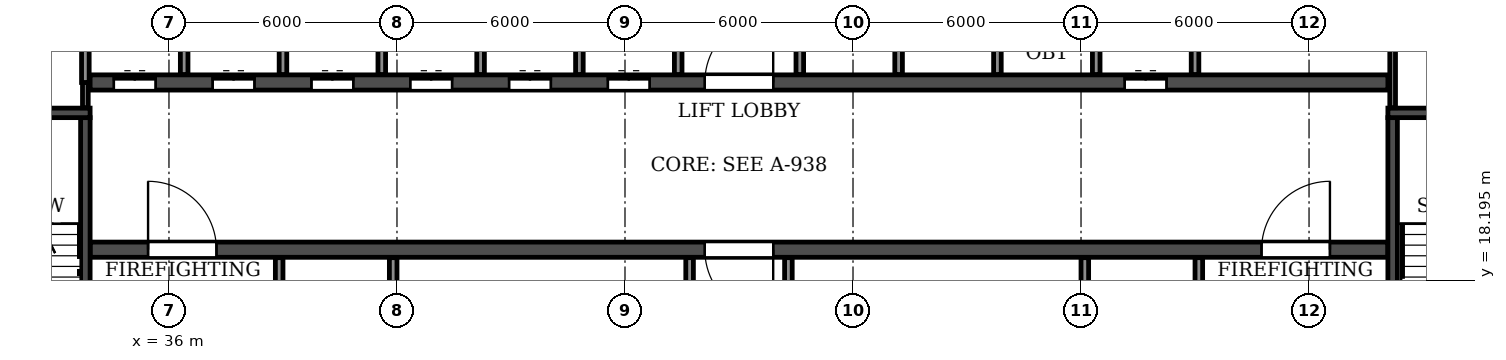
"""IFC4 building model, lengths in metres.
Left out: names, types, materials, properties, quantities, classifications, styles, units other than length and angle.
Written with IfcOpenShell. Run it as: python <this file> out.ifc"""

import sys

from ifc_helpers import new_model, si_unit, direction, frame, frame_2d, origin, place, context, subcontext, project, spatial, rectangle, extrude, element, fill, save


model = new_model("IFC4")
c1 = context("Model", 3, precision=1e-05, world=origin(), true_north=direction((0.0, 1.0)))
c2 = subcontext(c1, "Body", "Model", "MODEL_VIEW")
j1 = project(units=[si_unit("LENGTHUNIT", "METRE"), si_unit("PLANEANGLEUNIT", "RADIAN")], contexts=[c1])
p1 = place(None, origin())
s1 = spatial("IfcSite", under=j1, at=p1, CompositionType="ELEMENT")
p2 = place(p1, origin())
s2 = spatial("IfcBuilding", under=s1, at=p2, CompositionType="ELEMENT")
p3 = place(p2, frame((0.0, 0.0, 214.8)))
s3 = spatial("IfcBuildingStorey", under=s2, at=p3, CompositionType="ELEMENT", Elevation=214.8)
p4 = place(p3, frame((33.925, 19.0, 0.0), z_axis=(0.0, 0.0, 1.0), x_axis=(1.0, 0.0, 0.0)))
e1 = element("IfcWall", 1, at=p4, inside=s3, PredefinedType="SOLIDWALL", context=c2, shape_type="SweptSolid", body=[
    extrude(rectangle(XDim=34.15, YDim=0.4, at=frame_2d((17.075, 0.0))), origin(), (0.0, 0.0, 1.0), 6.38),
])
p5 = place(p4, frame((16.175, 0.0, 0.0)))
e2 = element("IfcOpeningElement", 2, at=p5, cuts=e1, PredefinedType="OPENING", context=c2, shape_type="SweptSolid", body=[
    extrude(rectangle(XDim=1.8, YDim=2.1, at=frame_2d((0.9, 1.05))), frame((0.0, 0.21, 0.0), z_axis=(0.0, -1.0, 0.0), x_axis=(1.0, 0.0, 0.0)), (0.0, 0.0, 1.0), 0.42),
])
p6 = place(p4, frame((1.525, 0.0, 0.0)))
e3 = element("IfcOpeningElement", 3, at=p6, cuts=e1, PredefinedType="OPENING", context=c2, shape_type="SweptSolid", body=[
    extrude(rectangle(XDim=1.8, YDim=2.1, at=frame_2d((0.9, 1.05))), frame((0.0, 0.21, 0.0), z_axis=(0.0, -1.0, 0.0), x_axis=(1.0, 0.0, 0.0)), (0.0, 0.0, 1.0), 0.42),
])
p7 = place(p4, frame((30.825, 0.0, 0.0)))
e4 = element("IfcOpeningElement", 4, at=p7, cuts=e1, PredefinedType="OPENING", context=c2, shape_type="SweptSolid", body=[
    extrude(rectangle(XDim=1.8, YDim=2.1, at=frame_2d((0.9, 1.05))), frame((0.0, 0.21, 0.0), z_axis=(0.0, -1.0, 0.0), x_axis=(1.0, 0.0, 0.0)), (0.0, 0.0, 1.0), 0.42),
])
p8 = place(p3, frame((33.925, 23.4, 0.0), z_axis=(0.0, 0.0, 1.0), x_axis=(1.0, 0.0, 0.0)))
e5 = element("IfcWall", 5, at=p8, inside=s3, PredefinedType="SOLIDWALL", context=c2, shape_type="SweptSolid", body=[
    extrude(rectangle(XDim=34.15, YDim=0.4, at=frame_2d((17.075, 0.0))), origin(), (0.0, 0.0, 1.0), 6.38),
])
p9 = place(p8, frame((16.175, 0.0, 0.0)))
e6 = element("IfcOpeningElement", 6, at=p9, cuts=e5, PredefinedType="OPENING", context=c2, shape_type="SweptSolid", body=[
    extrude(rectangle(XDim=1.8, YDim=2.1, at=frame_2d((0.9, 1.05))), frame((0.0, 0.21, 0.0), z_axis=(0.0, -1.0, 0.0), x_axis=(1.0, 0.0, 0.0)), (0.0, 0.0, 1.0), 0.42),
])
p10 = place(p8, frame((0.625, 0.0, 0.0)))
e7 = element("IfcOpeningElement", 7, at=p10, cuts=e5, PredefinedType="OPENING", context=c2, shape_type="SweptSolid", body=[
    extrude(rectangle(XDim=1.1, YDim=2.1, at=frame_2d((0.55, 1.05))), frame((0.0, 0.21, 0.0), z_axis=(0.0, -1.0, 0.0), x_axis=(1.0, 0.0, 0.0)), (0.0, 0.0, 1.0), 0.42),
])
p11 = place(p8, frame((3.225, 0.0, 0.0)))
e8 = element("IfcOpeningElement", 8, at=p11, cuts=e5, PredefinedType="OPENING", context=c2, shape_type="SweptSolid", body=[
    extrude(rectangle(XDim=1.1, YDim=2.1, at=frame_2d((0.55, 1.05))), frame((0.0, 0.21, 0.0), z_axis=(0.0, -1.0, 0.0), x_axis=(1.0, 0.0, 0.0)), (0.0, 0.0, 1.0), 0.42),
])
p12 = place(p8, frame((5.825, 0.0, 0.0)))
e9 = element("IfcOpeningElement", 9, at=p12, cuts=e5, PredefinedType="OPENING", context=c2, shape_type="SweptSolid", body=[
    extrude(rectangle(XDim=1.1, YDim=2.1, at=frame_2d((0.55, 1.05))), frame((0.0, 0.21, 0.0), z_axis=(0.0, -1.0, 0.0), x_axis=(1.0, 0.0, 0.0)), (0.0, 0.0, 1.0), 0.42),
])
p13 = place(p8, frame((8.425, 0.0, 0.0)))
e10 = element("IfcOpeningElement", 10, at=p13, cuts=e5, PredefinedType="OPENING", context=c2, shape_type="SweptSolid", body=[
    extrude(rectangle(XDim=1.1, YDim=2.1, at=frame_2d((0.55, 1.05))), frame((0.0, 0.21, 0.0), z_axis=(0.0, -1.0, 0.0), x_axis=(1.0, 0.0, 0.0)), (0.0, 0.0, 1.0), 0.42),
])
p14 = place(p8, frame((11.025, 0.0, 0.0)))
e11 = element("IfcOpeningElement", 11, at=p14, cuts=e5, PredefinedType="OPENING", context=c2, shape_type="SweptSolid", body=[
    extrude(rectangle(XDim=1.1, YDim=2.1, at=frame_2d((0.55, 1.05))), frame((0.0, 0.21, 0.0), z_axis=(0.0, -1.0, 0.0), x_axis=(1.0, 0.0, 0.0)), (0.0, 0.0, 1.0), 0.42),
])
p15 = place(p8, frame((13.625, 0.0, 0.0)))
e12 = element("IfcOpeningElement", 12, at=p15, cuts=e5, PredefinedType="OPENING", context=c2, shape_type="SweptSolid", body=[
    extrude(rectangle(XDim=1.1, YDim=2.1, at=frame_2d((0.55, 1.05))), frame((0.0, 0.21, 0.0), z_axis=(0.0, -1.0, 0.0), x_axis=(1.0, 0.0, 0.0)), (0.0, 0.0, 1.0), 0.42),
])
p16 = place(p8, frame((27.225, 0.0, 0.0)))
e13 = element("IfcOpeningElement", 13, at=p16, cuts=e5, PredefinedType="OPENING", context=c2, shape_type="SweptSolid", body=[
    extrude(rectangle(XDim=1.1, YDim=2.1, at=frame_2d((0.55, 1.05))), frame((0.0, 0.21, 0.0), z_axis=(0.0, -1.0, 0.0), x_axis=(1.0, 0.0, 0.0)), (0.0, 0.0, 1.0), 0.42),
])
p17 = place(p3, frame((33.8, 14.8, 0.0), z_axis=(0.0, 0.0, 1.0), x_axis=(0.0, 1.0, 0.0)))
e14 = element("IfcWall", 14, at=p17, inside=s3, PredefinedType="SOLIDWALL", context=c2, shape_type="SweptSolid", body=[
    extrude(rectangle(XDim=7.675, YDim=0.25, at=frame_2d((3.837, 0.0))), origin(), (0.0, 0.0, 1.0), 6.38),
])
p18 = place(p17, frame((0.5, 0.0, 0.0)))
e15 = element("IfcOpeningElement", 15, at=p18, cuts=e14, PredefinedType="OPENING", context=c2, shape_type="SweptSolid", body=[
    extrude(rectangle(XDim=1.0, YDim=2.1, at=frame_2d((0.5, 1.05))), frame((0.0, 0.135, 0.0), z_axis=(0.0, -1.0, 0.0), x_axis=(1.0, 0.0, 0.0)), (0.0, 0.0, 1.0), 0.27),
])
p19 = place(p3, frame((29.875, 22.6, 0.0), z_axis=(0.0, 0.0, 1.0), x_axis=(1.0, 0.0, 0.0)))
e16 = element("IfcWall", 16, at=p19, inside=s3, PredefinedType="SOLIDWALL", context=c2, shape_type="SweptSolid", body=[
    extrude(rectangle(XDim=4.05, YDim=0.25, at=frame_2d((2.025, 0.0))), origin(), (0.0, 0.0, 1.0), 6.38),
])
p20 = place(p3, frame((68.2, 14.8, 0.0), z_axis=(0.0, 0.0, 1.0), x_axis=(0.0, 1.0, 0.0)))
e17 = element("IfcWall", 17, at=p20, inside=s3, PredefinedType="SOLIDWALL", context=c2, shape_type="SweptSolid", body=[
    extrude(rectangle(XDim=7.675, YDim=0.25, at=frame_2d((3.837, 0.0))), origin(), (0.0, 0.0, 1.0), 6.38),
])
p21 = place(p20, frame((0.5, 0.0, 0.0)))
e18 = element("IfcOpeningElement", 18, at=p21, cuts=e17, PredefinedType="OPENING", context=c2, shape_type="SweptSolid", body=[
    extrude(rectangle(XDim=1.0, YDim=2.1, at=frame_2d((0.5, 1.05))), frame((0.0, 0.135, 0.0), z_axis=(0.0, -1.0, 0.0), x_axis=(1.0, 0.0, 0.0)), (0.0, 0.0, 1.0), 0.27),
])
p22 = place(p3, frame((68.075, 22.6, 0.0), z_axis=(0.0, 0.0, 1.0), x_axis=(1.0, 0.0, 0.0)))
e19 = element("IfcWall", 19, at=p22, inside=s3, PredefinedType="SOLIDWALL", context=c2, shape_type="SweptSolid", body=[
    extrude(rectangle(XDim=4.05, YDim=0.25, at=frame_2d((2.025, 0.0))), origin(), (0.0, 0.0, 1.0), 6.38),
])
for number, where, z_axis, x_axis in (
    (20, (49.7, 14.91, 0.0), (0.0, 0.0, 1.0), (0.0, 1.0, 0.0)),
    (21, (52.3, 14.91, 0.0), (0.0, 0.0, 1.0), (0.0, 1.0, 0.0)),
):
    element("IfcWall", number, at=place(p3, frame(where, z_axis=z_axis, x_axis=x_axis)), inside=s3, PredefinedType="PARTITIONING", context=c2, shape_type="SweptSolid", body=[
        extrude(rectangle(XDim=3.88, YDim=0.2, at=frame_2d((1.94, 0.0))), origin(), (0.0, 0.0, 1.0), 6.38),
    ])
for number, where, z_axis, x_axis in (
    (22, (52.6, 23.61, 0.0), (0.0, 0.0, 1.0), (0.0, 1.0, 0.0)),
    (23, (55.2, 23.61, 0.0), (0.0, 0.0, 1.0), (0.0, 1.0, 0.0)),
):
    element("IfcWall", number, at=place(p3, frame(where, z_axis=z_axis, x_axis=x_axis)), inside=s3, PredefinedType="PARTITIONING", context=c2, shape_type="SweptSolid", body=[
        extrude(rectangle(XDim=3.88, YDim=0.2, at=frame_2d((1.94, 0.0))), origin(), (0.0, 0.0, 1.0), 6.38),
    ])
p23 = place(p3, frame((33.8, 22.735, 0.0), z_axis=(0.0, 0.0, 1.0), x_axis=(0.0, 1.0, 0.0)))
e24 = element("IfcWall", 24, at=p23, inside=s3, PredefinedType="PARTITIONING", context=c2, shape_type="SweptSolid", body=[
    extrude(rectangle(XDim=0.665, YDim=0.15, at=frame_2d((0.333, 0.0))), origin(), (0.0, 0.0, 1.0), 6.38),
])
p24 = place(p3, frame((68.2, 22.735, 0.0), z_axis=(0.0, 0.0, 1.0), x_axis=(0.0, 1.0, 0.0)))
e25 = element("IfcWall", 25, at=p24, inside=s3, PredefinedType="PARTITIONING", context=c2, shape_type="SweptSolid", body=[
    extrude(rectangle(XDim=4.755, YDim=0.15, at=frame_2d((2.377, 0.0))), origin(), (0.0, 0.0, 1.0), 6.38),
])
p25 = place(p3, frame((33.8, 23.4, 0.0), z_axis=(0.0, 0.0, 1.0), x_axis=(0.0, 1.0, 0.0)))
e26 = element("IfcWall", 26, at=p25, inside=s3, PredefinedType="PARTITIONING", context=c2, shape_type="SweptSolid", body=[
    extrude(rectangle(XDim=2.7, YDim=0.2, at=frame_2d((1.35, 0.0))), origin(), (0.0, 0.0, 1.0), 6.38),
])
p26 = place(p3, frame((36.4, 23.61, 0.0), z_axis=(0.0, 0.0, 1.0), x_axis=(0.0, 1.0, 0.0)))
e27 = element("IfcWall", 27, at=p26, inside=s3, PredefinedType="PARTITIONING", context=c2, shape_type="SweptSolid", body=[
    extrude(rectangle(XDim=2.49, YDim=0.2, at=frame_2d((1.245, 0.0))), origin(), (0.0, 0.0, 1.0), 6.38),
])
p27 = place(p3, frame((38.9, 14.91, 0.0), z_axis=(0.0, 0.0, 1.0), x_axis=(0.0, 1.0, 0.0)))
e28 = element("IfcWall", 28, at=p27, inside=s3, PredefinedType="PARTITIONING", context=c2, shape_type="SweptSolid", body=[
    extrude(rectangle(XDim=3.88, YDim=0.2, at=frame_2d((1.94, 0.0))), origin(), (0.0, 0.0, 1.0), 6.38),
])
p28 = place(p27, frame((1.34, 0.0, 0.0)))
e29 = element("IfcOpeningElement", 29, at=p28, cuts=e28, PredefinedType="OPENING", context=c2, shape_type="SweptSolid", body=[
    extrude(rectangle(XDim=1.1, YDim=2.1, at=frame_2d((0.55, 1.05))), frame((0.0, 0.11, 0.0), z_axis=(0.0, -1.0, 0.0), x_axis=(1.0, 0.0, 0.0)), (0.0, 0.0, 1.0), 0.22),
])
for number, where, z_axis, x_axis in (
    (30, (39.0, 23.61, 0.0), (0.0, 0.0, 1.0), (0.0, 1.0, 0.0)),
    (31, (41.6, 23.61, 0.0), (0.0, 0.0, 1.0), (0.0, 1.0, 0.0)),
):
    element("IfcWall", number, at=place(p3, frame(where, z_axis=z_axis, x_axis=x_axis)), inside=s3, PredefinedType="PARTITIONING", context=c2, shape_type="SweptSolid", body=[
        extrude(rectangle(XDim=2.49, YDim=0.2, at=frame_2d((1.245, 0.0))), origin(), (0.0, 0.0, 1.0), 6.38),
    ])
p29 = place(p3, frame((41.9, 14.91, 0.0), z_axis=(0.0, 0.0, 1.0), x_axis=(0.0, 1.0, 0.0)))
e32 = element("IfcWall", 32, at=p29, inside=s3, PredefinedType="PARTITIONING", context=c2, shape_type="SweptSolid", body=[
    extrude(rectangle(XDim=3.88, YDim=0.2, at=frame_2d((1.94, 0.0))), origin(), (0.0, 0.0, 1.0), 6.38),
])
for number, where, z_axis, x_axis in (
    (33, (44.2, 23.61, 0.0), (0.0, 0.0, 1.0), (0.0, 1.0, 0.0)),
    (34, (46.8, 23.61, 0.0), (0.0, 0.0, 1.0), (0.0, 1.0, 0.0)),
):
    element("IfcWall", number, at=place(p3, frame(where, z_axis=z_axis, x_axis=x_axis)), inside=s3, PredefinedType="PARTITIONING", context=c2, shape_type="SweptSolid", body=[
        extrude(rectangle(XDim=3.88, YDim=0.2, at=frame_2d((1.94, 0.0))), origin(), (0.0, 0.0, 1.0), 6.38),
    ])
for number, where, z_axis, x_axis in (
    (35, (49.4, 23.61, 0.0), (0.0, 0.0, 1.0), (0.0, 1.0, 0.0)),
    (36, (57.8, 23.61, 0.0), (0.0, 0.0, 1.0), (0.0, 1.0, 0.0)),
):
    element("IfcWall", number, at=place(p3, frame(where, z_axis=z_axis, x_axis=x_axis)), inside=s3, PredefinedType="PARTITIONING", context=c2, shape_type="SweptSolid", body=[
        extrude(rectangle(XDim=2.49, YDim=0.2, at=frame_2d((1.245, 0.0))), origin(), (0.0, 0.0, 1.0), 6.38),
    ])
p30 = place(p3, frame((60.1, 14.91, 0.0), z_axis=(0.0, 0.0, 1.0), x_axis=(0.0, 1.0, 0.0)))
e37 = element("IfcWall", 37, at=p30, inside=s3, PredefinedType="PARTITIONING", context=c2, shape_type="SweptSolid", body=[
    extrude(rectangle(XDim=3.88, YDim=0.2, at=frame_2d((1.94, 0.0))), origin(), (0.0, 0.0, 1.0), 6.38),
])
for number, where, z_axis, x_axis in (
    (38, (60.4, 23.61, 0.0), (0.0, 0.0, 1.0), (0.0, 1.0, 0.0)),
    (39, (63.0, 23.61, 0.0), (0.0, 0.0, 1.0), (0.0, 1.0, 0.0)),
):
    element("IfcWall", number, at=place(p3, frame(where, z_axis=z_axis, x_axis=x_axis)), inside=s3, PredefinedType="PARTITIONING", context=c2, shape_type="SweptSolid", body=[
        extrude(rectangle(XDim=2.49, YDim=0.2, at=frame_2d((1.245, 0.0))), origin(), (0.0, 0.0, 1.0), 6.38),
    ])
p31 = place(p3, frame((63.1, 14.91, 0.0), z_axis=(0.0, 0.0, 1.0), x_axis=(0.0, 1.0, 0.0)))
e40 = element("IfcWall", 40, at=p31, inside=s3, PredefinedType="PARTITIONING", context=c2, shape_type="SweptSolid", body=[
    extrude(rectangle(XDim=3.88, YDim=0.2, at=frame_2d((1.94, 0.0))), origin(), (0.0, 0.0, 1.0), 6.38),
])
p32 = place(p31, frame((1.34, 0.0, 0.0)))
e41 = element("IfcOpeningElement", 41, at=p32, cuts=e40, PredefinedType="OPENING", context=c2, shape_type="SweptSolid", body=[
    extrude(rectangle(XDim=1.1, YDim=2.1, at=frame_2d((0.55, 1.05))), frame((0.0, 0.11, 0.0), z_axis=(0.0, -1.0, 0.0), x_axis=(1.0, 0.0, 0.0)), (0.0, 0.0, 1.0), 0.22),
])
p33 = place(p9, origin())
e42 = element("IfcDoor", 42, at=p33, inside=s3, OperationType="DOUBLE_DOOR_SINGLE_SWING", PredefinedType="DOOR", context=c2, shape_type="SweptSolid", body=[
    extrude(rectangle(XDim=1.8, YDim=2.1, at=frame_2d((0.9, 1.05))), frame((0.0, 0.025, 0.0), z_axis=(0.0, -1.0, 0.0), x_axis=(1.0, 0.0, 0.0)), (0.0, 0.0, 1.0), 0.05),
])
fill(e6, e42)
p34 = place(p5, frame((1.8, 0.0, 0.0), z_axis=(0.0, 0.0, 1.0), x_axis=(-1.0, 0.0, 0.0)))
e43 = element("IfcDoor", 43, at=p34, inside=s3, OperationType="DOUBLE_DOOR_SINGLE_SWING", PredefinedType="DOOR", context=c2, shape_type="SweptSolid", body=[
    extrude(rectangle(XDim=1.8, YDim=2.1, at=frame_2d((0.9, 1.05))), frame((0.0, 0.025, 0.0), z_axis=(0.0, -1.0, 0.0), x_axis=(1.0, 0.0, 0.0)), (0.0, 0.0, 1.0), 0.05),
])
fill(e2, e43)
p35 = place(p10, origin())
e44 = element("IfcDoor", 44, at=p35, inside=s3, OperationType="DOUBLE_DOOR_SLIDING", PredefinedType="DOOR", context=c2, shape_type="SweptSolid", body=[
    extrude(rectangle(XDim=1.1, YDim=2.1, at=frame_2d((0.55, 1.05))), frame((0.0, 0.025, 0.0), z_axis=(0.0, -1.0, 0.0), x_axis=(1.0, 0.0, 0.0)), (0.0, 0.0, 1.0), 0.05),
])
fill(e7, e44)
p36 = place(p6, origin())
e45 = element("IfcDoor", 45, at=p36, inside=s3, OperationType="DOUBLE_DOOR_SINGLE_SWING", PredefinedType="DOOR", context=c2, shape_type="SweptSolid", body=[
    extrude(rectangle(XDim=1.8, YDim=2.1, at=frame_2d((0.9, 1.05))), frame((0.0, 0.025, 0.0), z_axis=(0.0, -1.0, 0.0), x_axis=(1.0, 0.0, 0.0)), (0.0, 0.0, 1.0), 0.05),
])
fill(e3, e45)
p37 = place(p11, origin())
e46 = element("IfcDoor", 46, at=p37, inside=s3, OperationType="DOUBLE_DOOR_SLIDING", PredefinedType="DOOR", context=c2, shape_type="SweptSolid", body=[
    extrude(rectangle(XDim=1.1, YDim=2.1, at=frame_2d((0.55, 1.05))), frame((0.0, 0.025, 0.0), z_axis=(0.0, -1.0, 0.0), x_axis=(1.0, 0.0, 0.0)), (0.0, 0.0, 1.0), 0.05),
])
fill(e8, e46)
p38 = place(p12, origin())
e47 = element("IfcDoor", 47, at=p38, inside=s3, OperationType="DOUBLE_DOOR_SLIDING", PredefinedType="DOOR", context=c2, shape_type="SweptSolid", body=[
    extrude(rectangle(XDim=1.1, YDim=2.1, at=frame_2d((0.55, 1.05))), frame((0.0, 0.025, 0.0), z_axis=(0.0, -1.0, 0.0), x_axis=(1.0, 0.0, 0.0)), (0.0, 0.0, 1.0), 0.05),
])
fill(e9, e47)
p39 = place(p13, origin())
e48 = element("IfcDoor", 48, at=p39, inside=s3, OperationType="DOUBLE_DOOR_SLIDING", PredefinedType="DOOR", context=c2, shape_type="SweptSolid", body=[
    extrude(rectangle(XDim=1.1, YDim=2.1, at=frame_2d((0.55, 1.05))), frame((0.0, 0.025, 0.0), z_axis=(0.0, -1.0, 0.0), x_axis=(1.0, 0.0, 0.0)), (0.0, 0.0, 1.0), 0.05),
])
fill(e10, e48)
p40 = place(p14, origin())
e49 = element("IfcDoor", 49, at=p40, inside=s3, OperationType="DOUBLE_DOOR_SLIDING", PredefinedType="DOOR", context=c2, shape_type="SweptSolid", body=[
    extrude(rectangle(XDim=1.1, YDim=2.1, at=frame_2d((0.55, 1.05))), frame((0.0, 0.025, 0.0), z_axis=(0.0, -1.0, 0.0), x_axis=(1.0, 0.0, 0.0)), (0.0, 0.0, 1.0), 0.05),
])
fill(e11, e49)
p41 = place(p15, origin())
e50 = element("IfcDoor", 50, at=p41, inside=s3, OperationType="DOUBLE_DOOR_SLIDING", PredefinedType="DOOR", context=c2, shape_type="SweptSolid", body=[
    extrude(rectangle(XDim=1.1, YDim=2.1, at=frame_2d((0.55, 1.05))), frame((0.0, 0.025, 0.0), z_axis=(0.0, -1.0, 0.0), x_axis=(1.0, 0.0, 0.0)), (0.0, 0.0, 1.0), 0.05),
])
fill(e12, e50)
p42 = place(p16, origin())
e51 = element("IfcDoor", 51, at=p42, inside=s3, OperationType="DOUBLE_DOOR_SLIDING", PredefinedType="DOOR", context=c2, shape_type="SweptSolid", body=[
    extrude(rectangle(XDim=1.1, YDim=2.1, at=frame_2d((0.55, 1.05))), frame((0.0, 0.025, 0.0), z_axis=(0.0, -1.0, 0.0), x_axis=(1.0, 0.0, 0.0)), (0.0, 0.0, 1.0), 0.05),
])
fill(e13, e51)
p43 = place(p7, origin())
e52 = element("IfcDoor", 52, at=p43, inside=s3, OperationType="DOUBLE_DOOR_SINGLE_SWING", PredefinedType="DOOR", context=c2, shape_type="SweptSolid", body=[
    extrude(rectangle(XDim=1.8, YDim=2.1, at=frame_2d((0.9, 1.05))), frame((0.0, 0.025, 0.0), z_axis=(0.0, -1.0, 0.0), x_axis=(1.0, 0.0, 0.0)), (0.0, 0.0, 1.0), 0.05),
])
fill(e4, e52)
save(model, sys.argv[1])
